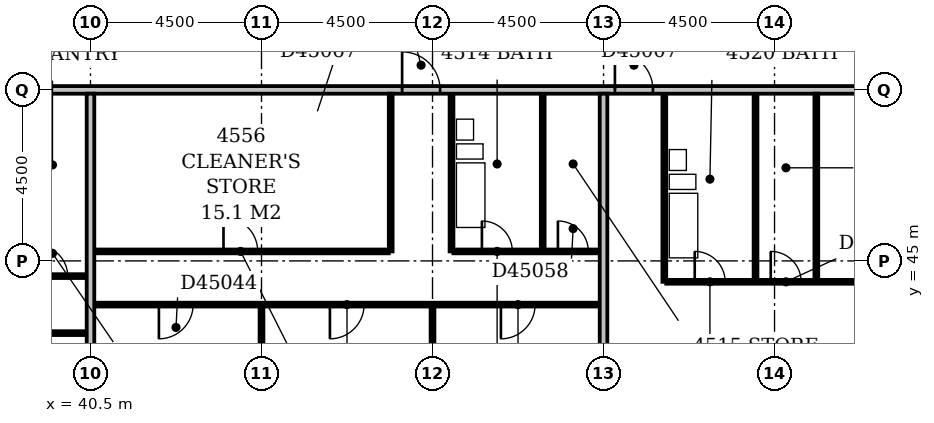
"""IFC4 building model, lengths in metres.
Left out: names, types, materials, properties, quantities, classifications, styles, units other than length and angle.
Written with IfcOpenShell. Run it as: python <this file> out.ifc"""

import sys

from ifc_helpers import new_model, si_unit, direction, frame, frame_2d, origin, place, context, subcontext, project, spatial, rectangle, extrude, element, fill, save


model = new_model("IFC4")
c1 = context("Model", 3, precision=1e-05, world=origin(), true_north=direction((0.0, 1.0)))
c2 = subcontext(c1, "Body", "Model", "MODEL_VIEW")
j1 = project(units=[si_unit("LENGTHUNIT", "METRE"), si_unit("PLANEANGLEUNIT", "RADIAN")], contexts=[c1])
p1 = place(None, origin())
s1 = spatial("IfcSite", under=j1, at=p1, CompositionType="ELEMENT")
p2 = place(p1, origin())
s2 = spatial("IfcBuilding", under=s1, at=p2, CompositionType="ELEMENT")
p3 = place(p2, frame((0.0, 0.0, 179.0)))
s3 = spatial("IfcBuildingStorey", under=s2, at=p3, CompositionType="ELEMENT", Elevation=179.0)
p4 = place(p3, frame((40.5, 36.45, 0.0), z_axis=(0.0, 0.0, 1.0), x_axis=(0.0, 1.0, 0.0)))
e1 = element("IfcWall", 1, at=p4, inside=s3, PredefinedType="PARTITIONING", context=c2, shape_type="SweptSolid", body=[
    extrude(rectangle(XDim=12.95, YDim=0.2, at=frame_2d((6.475, 0.0))), origin(), (0.0, 0.0, 1.0), 3.3),
])
p5 = place(p3, frame((45.0, 36.45, 0.0), z_axis=(0.0, 0.0, 1.0), x_axis=(0.0, 1.0, 0.0)))
e2 = element("IfcWall", 2, at=p5, inside=s3, PredefinedType="PARTITIONING", context=c2, shape_type="SweptSolid", body=[
    extrude(rectangle(XDim=7.35, YDim=0.1, at=frame_2d((3.675, 0.0))), origin(), (0.0, 0.0, 1.0), 2.6),
])
p6 = place(p3, frame((49.5, 36.45, 0.0), z_axis=(0.0, 0.0, 1.0), x_axis=(0.0, 1.0, 0.0)))
e3 = element("IfcWall", 3, at=p6, inside=s3, PredefinedType="PARTITIONING", context=c2, shape_type="SweptSolid", body=[
    extrude(rectangle(XDim=7.35, YDim=0.1, at=frame_2d((3.675, 0.0))), origin(), (0.0, 0.0, 1.0), 3.3),
])
p7 = place(p3, frame((54.0, 36.45, 0.0), z_axis=(0.0, 0.0, 1.0), x_axis=(0.0, 1.0, 0.0)))
e4 = element("IfcWall", 4, at=p7, inside=s3, PredefinedType="PARTITIONING", context=c2, shape_type="SweptSolid", body=[
    extrude(rectangle(XDim=12.95, YDim=0.2, at=frame_2d((6.475, 0.0))), origin(), (0.0, 0.0, 1.0), 2.6),
])
p8 = place(p3, frame((22.6, 43.1, 0.0), z_axis=(0.0, 0.0, 1.0), x_axis=(1.0, 0.0, 0.0)))
e5 = element("IfcWall", 5, at=p8, inside=s3, PredefinedType="PARTITIONING", context=c2, shape_type="SweptSolid", body=[
    extrude(rectangle(XDim=17.8, YDim=0.1, at=frame_2d((8.9, 0.0))), origin(), (0.0, 0.0, 1.0), 3.3),
])
p9 = place(p8, frame((3.9, 0.0, 0.0)))
e6 = element("IfcOpeningElement", 6, at=p9, cuts=e5, PredefinedType="OPENING", context=c2, shape_type="SweptSolid", body=[
    extrude(rectangle(XDim=0.9, YDim=2.1, at=frame_2d((0.45, 1.05))), frame((0.0, 0.062, 0.0), z_axis=(0.0, -1.0, 0.0), x_axis=(1.0, 0.0, 0.0)), (0.0, 0.0, 1.0), 0.124),
])
p10 = place(p8, frame((10.7, 0.0, 0.0)))
e7 = element("IfcOpeningElement", 7, at=p10, cuts=e5, PredefinedType="OPENING", context=c2, shape_type="SweptSolid", body=[
    extrude(rectangle(XDim=0.9, YDim=2.1, at=frame_2d((0.45, 1.05))), frame((0.0, 0.062, 0.0), z_axis=(0.0, -1.0, 0.0), x_axis=(1.0, 0.0, 0.0)), (0.0, 0.0, 1.0), 0.124),
])
p11 = place(p8, frame((14.05, 0.0, 0.0)))
e8 = element("IfcOpeningElement", 8, at=p11, cuts=e5, PredefinedType="OPENING", context=c2, shape_type="SweptSolid", body=[
    extrude(rectangle(XDim=0.9, YDim=2.1, at=frame_2d((0.45, 1.05))), frame((0.0, 0.062, 0.0), z_axis=(0.0, -1.0, 0.0), x_axis=(1.0, 0.0, 0.0)), (0.0, 0.0, 1.0), 0.124),
])
p12 = place(p3, frame((40.6, 43.85, 0.0), z_axis=(0.0, 0.0, 1.0), x_axis=(1.0, 0.0, 0.0)))
e9 = element("IfcWall", 9, at=p12, inside=s3, PredefinedType="PARTITIONING", context=c2, shape_type="SweptSolid", body=[
    extrude(rectangle(XDim=13.3, YDim=0.1, at=frame_2d((6.65, 0.0))), origin(), (0.0, 0.0, 1.0), 3.3),
])
p13 = place(p12, frame((1.7, 0.0, 0.0)))
e10 = element("IfcOpeningElement", 10, at=p13, cuts=e9, PredefinedType="OPENING", context=c2, shape_type="SweptSolid", body=[
    extrude(rectangle(XDim=0.9, YDim=2.1, at=frame_2d((0.45, 1.05))), frame((0.0, 0.062, 0.0), z_axis=(0.0, -1.0, 0.0), x_axis=(1.0, 0.0, 0.0)), (0.0, 0.0, 1.0), 0.124),
])
p14 = place(p12, frame((6.2, 0.0, 0.0)))
e11 = element("IfcOpeningElement", 11, at=p14, cuts=e9, PredefinedType="OPENING", context=c2, shape_type="SweptSolid", body=[
    extrude(rectangle(XDim=0.9, YDim=2.1, at=frame_2d((0.45, 1.05))), frame((0.0, 0.062, 0.0), z_axis=(0.0, -1.0, 0.0), x_axis=(1.0, 0.0, 0.0)), (0.0, 0.0, 1.0), 0.124),
])
p15 = place(p12, frame((10.7, 0.0, 0.0)))
e12 = element("IfcOpeningElement", 12, at=p15, cuts=e9, PredefinedType="OPENING", context=c2, shape_type="SweptSolid", body=[
    extrude(rectangle(XDim=0.9, YDim=2.1, at=frame_2d((0.45, 1.05))), frame((0.0, 0.062, 0.0), z_axis=(0.0, -1.0, 0.0), x_axis=(1.0, 0.0, 0.0)), (0.0, 0.0, 1.0), 0.124),
])
p16 = place(p3, frame((55.6, 44.45, 0.0), z_axis=(0.0, 0.0, 1.0), x_axis=(0.0, 1.0, 0.0)))
e13 = element("IfcWall", 13, at=p16, inside=s3, PredefinedType="PLUMBINGWALL", context=c2, shape_type="SweptSolid", body=[
    extrude(rectangle(XDim=4.95, YDim=0.1, at=frame_2d((2.475, 0.0))), origin(), (0.0, 0.0, 1.0), 3.3),
])
p17 = place(p3, frame((55.65, 44.45, 0.0), z_axis=(0.0, 0.0, 1.0), x_axis=(1.0, 0.0, 0.0)))
e14 = element("IfcWall", 14, at=p17, inside=s3, PredefinedType="PARTITIONING", context=c2, shape_type="SweptSolid", body=[
    extrude(rectangle(XDim=12.45, YDim=0.1, at=frame_2d((6.225, 0.0))), origin(), (0.0, 0.0, 1.0), 3.3),
])
p18 = place(p17, frame((0.75, 0.0, 0.0)))
e15 = element("IfcOpeningElement", 15, at=p18, cuts=e14, PredefinedType="OPENING", context=c2, shape_type="SweptSolid", body=[
    extrude(rectangle(XDim=0.8, YDim=2.1, at=frame_2d((0.4, 1.05))), frame((0.0, 0.062, 0.0), z_axis=(0.0, -1.0, 0.0), x_axis=(1.0, 0.0, 0.0)), (0.0, 0.0, 1.0), 0.124),
])
p19 = place(p17, frame((7.45, 0.0, 0.0)))
e16 = element("IfcOpeningElement", 16, at=p19, cuts=e14, PredefinedType="OPENING", context=c2, shape_type="SweptSolid", body=[
    extrude(rectangle(XDim=0.9, YDim=2.1, at=frame_2d((0.45, 1.05))), frame((0.0, 0.062, 0.0), z_axis=(0.0, -1.0, 0.0), x_axis=(1.0, 0.0, 0.0)), (0.0, 0.0, 1.0), 0.124),
])
p20 = place(p17, frame((2.75, 0.0, 0.0)))
e17 = element("IfcOpeningElement", 17, at=p20, cuts=e14, PredefinedType="OPENING", context=c2, shape_type="SweptSolid", body=[
    extrude(rectangle(XDim=0.8, YDim=2.1, at=frame_2d((0.4, 1.05))), frame((0.0, 0.062, 0.0), z_axis=(0.0, -1.0, 0.0), x_axis=(1.0, 0.0, 0.0)), (0.0, 0.0, 1.0), 0.124),
])
p21 = place(p3, frame((58.0, 44.5, 0.0), z_axis=(0.0, 0.0, 1.0), x_axis=(0.0, 1.0, 0.0)))
e18 = element("IfcWall", 18, at=p21, inside=s3, PredefinedType="PLUMBINGWALL", context=c2, shape_type="SweptSolid", body=[
    extrude(rectangle(XDim=4.9, YDim=0.1, at=frame_2d((2.45, 0.0))), origin(), (0.0, 0.0, 1.0), 3.3),
])
p22 = place(p3, frame((59.6, 44.5, 0.0), z_axis=(0.0, 0.0, 1.0), x_axis=(0.0, 1.0, 0.0)))
e19 = element("IfcWall", 19, at=p22, inside=s3, PredefinedType="PARTITIONING", context=c2, shape_type="SweptSolid", body=[
    extrude(rectangle(XDim=4.9, YDim=0.1, at=frame_2d((2.45, 0.0))), origin(), (0.0, 0.0, 1.0), 3.3),
])
p23 = place(p3, frame((31.05, 44.6, 0.0), z_axis=(0.0, 0.0, 1.0), x_axis=(1.0, 0.0, 0.0)))
e20 = element("IfcWall", 20, at=p23, inside=s3, PredefinedType="PARTITIONING", context=c2, shape_type="SweptSolid", body=[
    extrude(rectangle(XDim=9.35, YDim=0.1, at=frame_2d((4.675, 0.0))), origin(), (0.0, 0.0, 1.0), 3.3),
])
p24 = place(p23, frame((0.75, 0.0, 0.0)))
e21 = element("IfcOpeningElement", 21, at=p24, cuts=e20, PredefinedType="OPENING", context=c2, shape_type="SweptSolid", body=[
    extrude(rectangle(XDim=0.8, YDim=2.1, at=frame_2d((0.4, 1.05))), frame((0.0, 0.062, 0.0), z_axis=(0.0, -1.0, 0.0), x_axis=(1.0, 0.0, 0.0)), (0.0, 0.0, 1.0), 0.124),
])
p25 = place(p23, frame((8.05, 0.0, 0.0)))
e22 = element("IfcOpeningElement", 22, at=p25, cuts=e20, PredefinedType="OPENING", context=c2, shape_type="SweptSolid", body=[
    extrude(rectangle(XDim=0.8, YDim=2.1, at=frame_2d((0.4, 1.05))), frame((0.0, 0.062, 0.0), z_axis=(0.0, -1.0, 0.0), x_axis=(1.0, 0.0, 0.0)), (0.0, 0.0, 1.0), 0.124),
])
p26 = place(p23, frame((4.25, 0.0, 0.0)))
e23 = element("IfcOpeningElement", 23, at=p26, cuts=e20, PredefinedType="OPENING", context=c2, shape_type="SweptSolid", body=[
    extrude(rectangle(XDim=0.8, YDim=2.1, at=frame_2d((0.4, 1.05))), frame((0.0, 0.062, 0.0), z_axis=(0.0, -1.0, 0.0), x_axis=(1.0, 0.0, 0.0)), (0.0, 0.0, 1.0), 0.124),
])
p27 = place(p23, frame((6.05, 0.0, 0.0)))
e24 = element("IfcOpeningElement", 24, at=p27, cuts=e20, PredefinedType="OPENING", context=c2, shape_type="SweptSolid", body=[
    extrude(rectangle(XDim=0.8, YDim=2.1, at=frame_2d((0.4, 1.05))), frame((0.0, 0.062, 0.0), z_axis=(0.0, -1.0, 0.0), x_axis=(1.0, 0.0, 0.0)), (0.0, 0.0, 1.0), 0.124),
])
p28 = place(p23, frame((2.7, 0.0, 0.0)))
e25 = element("IfcOpeningElement", 25, at=p28, cuts=e20, PredefinedType="OPENING", context=c2, shape_type="SweptSolid", body=[
    extrude(rectangle(XDim=0.8, YDim=2.1, at=frame_2d((0.4, 1.05))), frame((0.0, 0.062, 0.0), z_axis=(0.0, -1.0, 0.0), x_axis=(1.0, 0.0, 0.0)), (0.0, 0.0, 1.0), 0.124),
])
p29 = place(p3, frame((40.6, 45.25, 0.0), z_axis=(0.0, 0.0, 1.0), x_axis=(1.0, 0.0, 0.0)))
e26 = element("IfcWall", 26, at=p29, inside=s3, PredefinedType="PARTITIONING", context=c2, shape_type="SweptSolid", body=[
    extrude(rectangle(XDim=7.75, YDim=0.1, at=frame_2d((3.875, 0.0))), origin(), (0.0, 0.0, 1.0), 3.3),
])
p30 = place(p29, frame((3.4, 0.0, 0.0)))
e27 = element("IfcOpeningElement", 27, at=p30, cuts=e26, PredefinedType="OPENING", context=c2, shape_type="SweptSolid", body=[
    extrude(rectangle(XDim=0.9, YDim=2.1, at=frame_2d((0.45, 1.05))), frame((0.0, 0.062, 0.0), z_axis=(0.0, -1.0, 0.0), x_axis=(1.0, 0.0, 0.0)), (0.0, 0.0, 1.0), 0.124),
])
p31 = place(p3, frame((48.4, 45.25, 0.0), z_axis=(0.0, 0.0, 1.0), x_axis=(0.0, 1.0, 0.0)))
e28 = element("IfcWall", 28, at=p31, inside=s3, PredefinedType="PARTITIONING", context=c2, shape_type="SweptSolid", body=[
    extrude(rectangle(XDim=4.15, YDim=0.1, at=frame_2d((2.075, 0.0))), origin(), (0.0, 0.0, 1.0), 3.3),
])
p32 = place(p3, frame((50.0, 45.25, 0.0), z_axis=(0.0, 0.0, 1.0), x_axis=(0.0, 1.0, 0.0)))
e29 = element("IfcWall", 29, at=p32, inside=s3, PredefinedType="PLUMBINGWALL", context=c2, shape_type="SweptSolid", body=[
    extrude(rectangle(XDim=4.15, YDim=0.1, at=frame_2d((2.075, 0.0))), origin(), (0.0, 0.0, 1.0), 3.3),
])
p33 = place(p3, frame((50.05, 45.25, 0.0), z_axis=(0.0, 0.0, 1.0), x_axis=(1.0, 0.0, 0.0)))
e30 = element("IfcWall", 30, at=p33, inside=s3, PredefinedType="PARTITIONING", context=c2, shape_type="SweptSolid", body=[
    extrude(rectangle(XDim=3.85, YDim=0.1, at=frame_2d((1.925, 0.0))), origin(), (0.0, 0.0, 1.0), 3.3),
])
p34 = place(p33, frame((0.75, 0.0, 0.0)))
e31 = element("IfcOpeningElement", 31, at=p34, cuts=e30, PredefinedType="OPENING", context=c2, shape_type="SweptSolid", body=[
    extrude(rectangle(XDim=0.8, YDim=2.1, at=frame_2d((0.4, 1.05))), frame((0.0, 0.062, 0.0), z_axis=(0.0, -1.0, 0.0), x_axis=(1.0, 0.0, 0.0)), (0.0, 0.0, 1.0), 0.124),
])
p35 = place(p33, frame((2.75, 0.0, 0.0)))
e32 = element("IfcOpeningElement", 32, at=p35, cuts=e30, PredefinedType="OPENING", context=c2, shape_type="SweptSolid", body=[
    extrude(rectangle(XDim=0.8, YDim=2.1, at=frame_2d((0.4, 1.05))), frame((0.0, 0.062, 0.0), z_axis=(0.0, -1.0, 0.0), x_axis=(1.0, 0.0, 0.0)), (0.0, 0.0, 1.0), 0.124),
])
p36 = place(p3, frame((52.4, 45.3, 0.0), z_axis=(0.0, 0.0, 1.0), x_axis=(0.0, 1.0, 0.0)))
e33 = element("IfcWall", 33, at=p36, inside=s3, PredefinedType="PLUMBINGWALL", context=c2, shape_type="SweptSolid", body=[
    extrude(rectangle(XDim=4.1, YDim=0.1, at=frame_2d((2.05, 0.0))), origin(), (0.0, 0.0, 1.0), 3.3),
])
p37 = place(p3, frame((22.6, 49.5, 0.0), z_axis=(0.0, 0.0, 1.0), x_axis=(1.0, 0.0, 0.0)))
e34 = element("IfcWall", 34, at=p37, inside=s3, PredefinedType="PARTITIONING", context=c2, shape_type="SweptSolid", body=[
    extrude(rectangle(XDim=44.45, YDim=0.2, at=frame_2d((22.225, 0.0))), origin(), (0.0, 0.0, 1.0), 3.3),
])
p38 = place(p37, frame((7.1, 0.0, 0.0)))
e35 = element("IfcOpeningElement", 35, at=p38, cuts=e34, PredefinedType="OPENING", context=c2, shape_type="SweptSolid", body=[
    extrude(rectangle(XDim=1.0, YDim=2.1, at=frame_2d((0.5, 1.05))), frame((0.0, 0.112, 0.0), z_axis=(0.0, -1.0, 0.0), x_axis=(1.0, 0.0, 0.0)), (0.0, 0.0, 1.0), 0.224),
])
p39 = place(p37, frame((26.1, 0.0, 0.0)))
e36 = element("IfcOpeningElement", 36, at=p39, cuts=e34, PredefinedType="OPENING", context=c2, shape_type="SweptSolid", body=[
    extrude(rectangle(XDim=1.0, YDim=2.1, at=frame_2d((0.5, 1.05))), frame((0.0, 0.112, 0.0), z_axis=(0.0, -1.0, 0.0), x_axis=(1.0, 0.0, 0.0)), (0.0, 0.0, 1.0), 0.224),
])
p40 = place(p37, frame((31.7, 0.0, 0.0)))
e37 = element("IfcOpeningElement", 37, at=p40, cuts=e34, PredefinedType="OPENING", context=c2, shape_type="SweptSolid", body=[
    extrude(rectangle(XDim=1.0, YDim=2.1, at=frame_2d((0.5, 1.05))), frame((0.0, 0.112, 0.0), z_axis=(0.0, -1.0, 0.0), x_axis=(1.0, 0.0, 0.0)), (0.0, 0.0, 1.0), 0.224),
])
p41 = place(p13, frame((0.9, 0.0, 0.0), z_axis=(0.0, 0.0, 1.0), x_axis=(-1.0, 0.0, 0.0)))
e38 = element("IfcDoor", 38, at=p41, inside=s3, OperationType="SINGLE_SWING_RIGHT", PredefinedType="DOOR", context=c2, shape_type="SweptSolid", body=[
    extrude(rectangle(XDim=0.9, YDim=2.1, at=frame_2d((0.45, 1.05))), frame((0.0, 0.025, 0.0), z_axis=(0.0, -1.0, 0.0), x_axis=(1.0, 0.0, 0.0)), (0.0, 0.0, 1.0), 0.05),
])
fill(e10, e38)
p42 = place(p14, frame((0.9, 0.0, 0.0), z_axis=(0.0, 0.0, 1.0), x_axis=(-1.0, 0.0, 0.0)))
e39 = element("IfcDoor", 39, at=p42, inside=s3, OperationType="SINGLE_SWING_RIGHT", PredefinedType="DOOR", context=c2, shape_type="SweptSolid", body=[
    extrude(rectangle(XDim=0.9, YDim=2.1, at=frame_2d((0.45, 1.05))), frame((0.0, 0.025, 0.0), z_axis=(0.0, -1.0, 0.0), x_axis=(1.0, 0.0, 0.0)), (0.0, 0.0, 1.0), 0.05),
])
fill(e11, e39)
p43 = place(p15, frame((0.9, 0.0, 0.0), z_axis=(0.0, 0.0, 1.0), x_axis=(-1.0, 0.0, 0.0)))
e40 = element("IfcDoor", 40, at=p43, inside=s3, OperationType="SINGLE_SWING_RIGHT", PredefinedType="DOOR", context=c2, shape_type="SweptSolid", body=[
    extrude(rectangle(XDim=0.9, YDim=2.1, at=frame_2d((0.45, 1.05))), frame((0.0, 0.025, 0.0), z_axis=(0.0, -1.0, 0.0), x_axis=(1.0, 0.0, 0.0)), (0.0, 0.0, 1.0), 0.05),
])
fill(e12, e40)
p44 = place(p18, origin())
e41 = element("IfcDoor", 41, at=p44, inside=s3, OperationType="SINGLE_SWING_LEFT", PredefinedType="DOOR", context=c2, shape_type="SweptSolid", body=[
    extrude(rectangle(XDim=0.8, YDim=2.1, at=frame_2d((0.4, 1.05))), frame((0.0, 0.025, 0.0), z_axis=(0.0, -1.0, 0.0), x_axis=(1.0, 0.0, 0.0)), (0.0, 0.0, 1.0), 0.05),
])
fill(e15, e41)
p45 = place(p20, origin())
e42 = element("IfcDoor", 42, at=p45, inside=s3, OperationType="SINGLE_SWING_LEFT", PredefinedType="DOOR", context=c2, shape_type="SweptSolid", body=[
    extrude(rectangle(XDim=0.8, YDim=2.1, at=frame_2d((0.4, 1.05))), frame((0.0, 0.025, 0.0), z_axis=(0.0, -1.0, 0.0), x_axis=(1.0, 0.0, 0.0)), (0.0, 0.0, 1.0), 0.05),
])
fill(e17, e42)
p46 = place(p25, origin())
e43 = element("IfcDoor", 43, at=p46, inside=s3, OperationType="SINGLE_SWING_LEFT", PredefinedType="DOOR", context=c2, shape_type="SweptSolid", body=[
    extrude(rectangle(XDim=0.8, YDim=2.1, at=frame_2d((0.4, 1.05))), frame((0.0, 0.025, 0.0), z_axis=(0.0, -1.0, 0.0), x_axis=(1.0, 0.0, 0.0)), (0.0, 0.0, 1.0), 0.05),
])
fill(e22, e43)
p47 = place(p30, origin())
e44 = element("IfcDoor", 44, at=p47, inside=s3, OperationType="SINGLE_SWING_LEFT", PredefinedType="DOOR", context=c2, shape_type="SweptSolid", body=[
    extrude(rectangle(XDim=0.9, YDim=2.1, at=frame_2d((0.45, 1.05))), frame((0.0, 0.025, 0.0), z_axis=(0.0, -1.0, 0.0), x_axis=(1.0, 0.0, 0.0)), (0.0, 0.0, 1.0), 0.05),
])
fill(e27, e44)
p48 = place(p34, origin())
e45 = element("IfcDoor", 45, at=p48, inside=s3, OperationType="SINGLE_SWING_LEFT", PredefinedType="DOOR", context=c2, shape_type="SweptSolid", body=[
    extrude(rectangle(XDim=0.8, YDim=2.1, at=frame_2d((0.4, 1.05))), frame((0.0, 0.025, 0.0), z_axis=(0.0, -1.0, 0.0), x_axis=(1.0, 0.0, 0.0)), (0.0, 0.0, 1.0), 0.05),
])
fill(e31, e45)
p49 = place(p35, origin())
e46 = element("IfcDoor", 46, at=p49, inside=s3, OperationType="SINGLE_SWING_LEFT", PredefinedType="DOOR", context=c2, shape_type="SweptSolid", body=[
    extrude(rectangle(XDim=0.8, YDim=2.1, at=frame_2d((0.4, 1.05))), frame((0.0, 0.025, 0.0), z_axis=(0.0, -1.0, 0.0), x_axis=(1.0, 0.0, 0.0)), (0.0, 0.0, 1.0), 0.05),
])
fill(e32, e46)
p50 = place(p39, origin())
e47 = element("IfcDoor", 47, at=p50, inside=s3, OperationType="SINGLE_SWING_LEFT", PredefinedType="DOOR", context=c2, shape_type="SweptSolid", body=[
    extrude(rectangle(XDim=1.0, YDim=2.1, at=frame_2d((0.5, 1.05))), frame((0.0, 0.025, 0.0), z_axis=(0.0, -1.0, 0.0), x_axis=(1.0, 0.0, 0.0)), (0.0, 0.0, 1.0), 0.05),
])
fill(e36, e47)
p51 = place(p40, origin())
e48 = element("IfcDoor", 48, at=p51, inside=s3, OperationType="SINGLE_SWING_LEFT", PredefinedType="DOOR", context=c2, shape_type="SweptSolid", body=[
    extrude(rectangle(XDim=1.0, YDim=2.1, at=frame_2d((0.5, 1.05))), frame((0.0, 0.025, 0.0), z_axis=(0.0, -1.0, 0.0), x_axis=(1.0, 0.0, 0.0)), (0.0, 0.0, 1.0), 0.05),
])
fill(e37, e48)
save(model, sys.argv[1])
